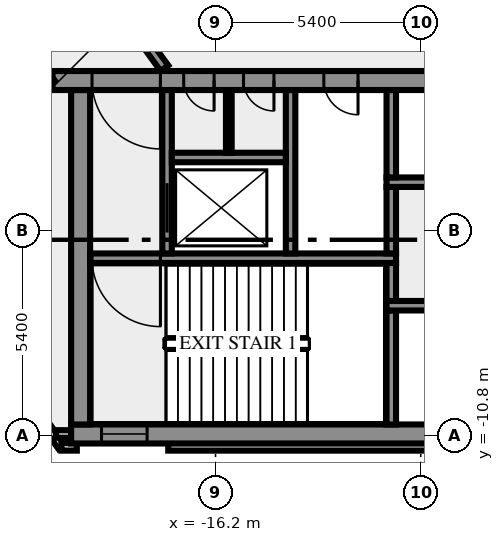
"""IFC4 building model, lengths in metres.
Left out: names, types, materials, properties, quantities, classifications, styles, units other than length and angle.
Written with IfcOpenShell. Run it as: python <this file> out.ifc"""

import sys

from ifc_helpers import new_model, si_unit, direction, frame, frame_2d, origin, place, context, subcontext, project, spatial, rectangle, extrude, element, fill, save


model = new_model("IFC4")
c1 = context("Model", 3, precision=1e-05, world=origin(), true_north=direction((0.0, 1.0)))
c2 = subcontext(c1, "Body", "Model", "MODEL_VIEW")
j1 = project(units=[si_unit("LENGTHUNIT", "METRE"), si_unit("PLANEANGLEUNIT", "RADIAN")], contexts=[c1])
p1 = place(None, origin())
s1 = spatial("IfcSite", under=j1, at=p1, CompositionType="ELEMENT")
p2 = place(p1, origin())
s2 = spatial("IfcBuilding", under=s1, at=p2, CompositionType="ELEMENT")
p3 = place(p2, frame((0.0, 0.0, 242.0)))
s3 = spatial("IfcBuildingStorey", under=s2, at=p3, CompositionType="ELEMENT", Elevation=242.0)
p4 = place(p3, frame((-21.833, -8.909, 0.0), z_axis=(0.0, 0.0, 1.0), x_axis=(0.587766567315, -0.809030569476, 0.0)))
e1 = element("IfcWall", 1, at=p4, inside=s3, PredefinedType="SOLIDWALL", context=c2, shape_type="SweptSolid", body=[
    extrude(rectangle(XDim=2.688, YDim=0.2, at=frame_2d((1.344, 0.0))), origin(), (0.0, 0.0, 1.0), 5.6),
])
p5 = place(p3, frame((-20.256, -11.088, 0.0), z_axis=(0.0, 0.0, 1.0), x_axis=(1.0, 0.0, 0.0)))
e2 = element("IfcWall", 2, at=p5, inside=s3, PredefinedType="SOLIDWALL", context=c2, shape_type="SweptSolid", body=[
    extrude(rectangle(XDim=0.406, YDim=0.2, at=frame_2d((0.203, 0.0))), origin(), (0.0, 0.0, 1.0), 5.6),
])
p6 = place(p3, frame((-17.444, -11.088, 0.0), z_axis=(0.0, 0.0, 1.0), x_axis=(1.0, 0.0, 0.0)))
e3 = element("IfcWall", 3, at=p6, inside=s3, PredefinedType="SOLIDWALL", context=c2, shape_type="SweptSolid", body=[
    extrude(rectangle(XDim=34.888, YDim=0.2, at=frame_2d((17.444, 0.0))), origin(), (0.0, 0.0, 1.0), 5.6),
])
p7 = place(p3, frame((-19.98, -10.75, 0.0), z_axis=(0.0, 0.0, 1.0), x_axis=(-1.0, 0.0, 0.0)))
e4 = element("IfcWall", 4, at=p7, inside=s3, PredefinedType="SOLIDWALL", context=c2, shape_type="SweptSolid", body=[
    extrude(rectangle(XDim=0.417, YDim=0.2, at=frame_2d((0.208, 0.0))), origin(), (0.0, 0.0, 1.0), 5.6),
])
p8 = place(p3, frame((-20.0, -10.75, 0.0), z_axis=(0.0, 0.0, 1.0), x_axis=(1.0, 0.0, 0.0)))
e5 = element("IfcWall", 5, at=p8, inside=s3, PredefinedType="SHEAR", context=c2, shape_type="SweptSolid", body=[
    extrude(rectangle(XDim=40.0, YDim=0.5, at=frame_2d((20.0, 0.0))), origin(), (0.0, 0.0, 1.0), 5.6),
])
p9 = place(p8, frame((0.8, 0.0, 1.0)))
e6 = element("IfcOpeningElement", 6, at=p9, cuts=e5, PredefinedType="OPENING", context=c2, shape_type="SweptSolid", body=[
    extrude(rectangle(XDim=1.2, YDim=1.2, at=frame_2d((0.6, 0.6))), frame((0.0, 0.26, 0.0), z_axis=(0.0, -1.0, 0.0), x_axis=(1.0, 0.0, 0.0)), (0.0, 0.0, 1.0), 0.52),
])
p10 = place(p8, frame((38.0, 0.0, 1.0)))
e7 = element("IfcOpeningElement", 7, at=p10, cuts=e5, PredefinedType="OPENING", context=c2, shape_type="SweptSolid", body=[
    extrude(rectangle(XDim=1.2, YDim=1.2, at=frame_2d((0.6, 0.6))), frame((0.0, 0.26, 0.0), z_axis=(0.0, -1.0, 0.0), x_axis=(1.0, 0.0, 0.0)), (0.0, 0.0, 1.0), 0.52),
])
p11 = place(p3, frame((-19.75, -10.5, 0.0), z_axis=(0.0, 0.0, 1.0), x_axis=(0.0, 1.0, 0.0)))
e8 = element("IfcWall", 8, at=p11, inside=s3, PredefinedType="SHEAR", context=c2, shape_type="SweptSolid", body=[
    extrude(rectangle(XDim=8.8, YDim=0.5, at=frame_2d((4.4, 0.0))), origin(), (0.0, 0.0, 1.0), 5.6),
])
p12 = place(p3, frame((-11.575, -10.5, 0.0), z_axis=(0.0, 0.0, 1.0), x_axis=(0.0, 1.0, 0.0)))
e9 = element("IfcWall", 9, at=p12, inside=s3, PredefinedType="SHEAR", context=c2, shape_type="SweptSolid", body=[
    extrude(rectangle(XDim=3.0, YDim=0.25, at=frame_2d((1.5, 0.0))), origin(), (0.0, 0.0, 1.0), 5.6),
])
p13 = place(p3, frame((11.7, -7.375, 0.0), z_axis=(0.0, 0.0, 1.0), x_axis=(-1.0, 0.0, 0.0)))
e10 = element("IfcWall", 10, at=p13, inside=s3, PredefinedType="SHEAR", context=c2, shape_type="SweptSolid", body=[
    extrude(rectangle(XDim=23.4, YDim=0.25, at=frame_2d((11.7, 0.0))), origin(), (0.0, 0.0, 1.0), 5.6),
])
p14 = place(p13, frame((14.4, 0.0, 0.0)))
e11 = element("IfcOpeningElement", 11, at=p14, cuts=e10, PredefinedType="OPENING", context=c2, shape_type="SweptSolid", body=[
    extrude(rectangle(XDim=0.9, YDim=2.1, at=frame_2d((0.45, 1.05))), frame((0.0, 0.135, 0.0), z_axis=(0.0, -1.0, 0.0), x_axis=(1.0, 0.0, 0.0)), (0.0, 0.0, 1.0), 0.27),
])
p15 = place(p13, frame((12.5, 0.0, 0.0)))
e12 = element("IfcOpeningElement", 12, at=p15, cuts=e10, PredefinedType="OPENING", context=c2, shape_type="SweptSolid", body=[
    extrude(rectangle(XDim=0.9, YDim=2.1, at=frame_2d((0.45, 1.05))), frame((0.0, 0.135, 0.0), z_axis=(0.0, -1.0, 0.0), x_axis=(1.0, 0.0, 0.0)), (0.0, 0.0, 1.0), 0.27),
])
p16 = place(p13, frame((10.6, 0.0, 0.0)))
e13 = element("IfcOpeningElement", 13, at=p16, cuts=e10, PredefinedType="OPENING", context=c2, shape_type="SweptSolid", body=[
    extrude(rectangle(XDim=0.9, YDim=2.1, at=frame_2d((0.45, 1.05))), frame((0.0, 0.135, 0.0), z_axis=(0.0, -1.0, 0.0), x_axis=(1.0, 0.0, 0.0)), (0.0, 0.0, 1.0), 0.27),
])
p17 = place(p3, frame((-11.575, -7.25, 0.0), z_axis=(0.0, 0.0, 1.0), x_axis=(0.0, 1.0, 0.0)))
e14 = element("IfcWall", 14, at=p17, inside=s3, PredefinedType="SHEAR", context=c2, shape_type="SweptSolid", body=[
    extrude(rectangle(XDim=1.0, YDim=0.25, at=frame_2d((0.5, 0.0))), origin(), (0.0, 0.0, 1.0), 5.6),
])
p18 = place(p3, frame((-11.45, -6.125, 0.0), z_axis=(0.0, 0.0, 1.0), x_axis=(-1.0, 0.0, 0.0)))
e15 = element("IfcWall", 15, at=p18, inside=s3, PredefinedType="SHEAR", context=c2, shape_type="SweptSolid", body=[
    extrude(rectangle(XDim=8.05, YDim=0.25, at=frame_2d((4.025, 0.0))), origin(), (0.0, 0.0, 1.0), 5.6),
])
p19 = place(p18, frame((6.2, 0.0, 0.0)))
e16 = element("IfcOpeningElement", 16, at=p19, cuts=e15, PredefinedType="OPENING", context=c2, shape_type="SweptSolid", body=[
    extrude(rectangle(XDim=1.8, YDim=2.1, at=frame_2d((0.9, 1.05))), frame((0.0, 0.135, 0.0), z_axis=(0.0, -1.0, 0.0), x_axis=(1.0, 0.0, 0.0)), (0.0, 0.0, 1.0), 0.27),
])
p20 = place(p3, frame((-17.475, -6.0, 0.0), z_axis=(0.0, 0.0, 1.0), x_axis=(0.0, 1.0, 0.0)))
e17 = element("IfcWall", 17, at=p20, inside=s3, PredefinedType="SHEAR", context=c2, shape_type="SweptSolid", body=[
    extrude(rectangle(XDim=4.3, YDim=0.25, at=frame_2d((2.15, 0.0))), origin(), (0.0, 0.0, 1.0), 5.6),
])
p21 = place(p20, frame((0.55, 0.0, 0.0)))
e18 = element("IfcOpeningElement", 18, at=p21, cuts=e17, PredefinedType="OPENING", context=c2, shape_type="SweptSolid", body=[
    extrude(rectangle(XDim=1.3, YDim=2.1, at=frame_2d((0.65, 1.05))), frame((0.0, 0.135, 0.0), z_axis=(0.0, -1.0, 0.0), x_axis=(1.0, 0.0, 0.0)), (0.0, 0.0, 1.0), 0.27),
])
p22 = place(p3, frame((-14.225, -6.0, 0.0), z_axis=(0.0, 0.0, 1.0), x_axis=(0.0, 1.0, 0.0)))
e19 = element("IfcWall", 19, at=p22, inside=s3, PredefinedType="SHEAR", context=c2, shape_type="SweptSolid", body=[
    extrude(rectangle(XDim=4.3, YDim=0.25, at=frame_2d((2.15, 0.0))), origin(), (0.0, 0.0, 1.0), 5.6),
])
p23 = place(p3, frame((-11.575, -6.0, 0.0), z_axis=(0.0, 0.0, 1.0), x_axis=(0.0, 1.0, 0.0)))
e20 = element("IfcWall", 20, at=p23, inside=s3, PredefinedType="SHEAR", context=c2, shape_type="SweptSolid", body=[
    extrude(rectangle(XDim=1.75, YDim=0.25, at=frame_2d((0.875, 0.0))), origin(), (0.0, 0.0, 1.0), 5.6),
])
p24 = place(p3, frame((-11.7, -4.125, 0.0), z_axis=(0.0, 0.0, 1.0), x_axis=(1.0, 0.0, 0.0)))
e21 = element("IfcWall", 21, at=p24, inside=s3, PredefinedType="SHEAR", context=c2, shape_type="SweptSolid", body=[
    extrude(rectangle(XDim=7.75, YDim=0.25, at=frame_2d((3.875, 0.0))), origin(), (0.0, 0.0, 1.0), 5.6),
])
p25 = place(p3, frame((-11.575, -4.0, 0.0), z_axis=(0.0, 0.0, 1.0), x_axis=(0.0, 1.0, 0.0)))
e22 = element("IfcWall", 22, at=p25, inside=s3, PredefinedType="SHEAR", context=c2, shape_type="SweptSolid", body=[
    extrude(rectangle(XDim=2.3, YDim=0.25, at=frame_2d((1.15, 0.0))), origin(), (0.0, 0.0, 1.0), 5.6),
])
p26 = place(p3, frame((-17.35, -3.475, 0.0), z_axis=(0.0, 0.0, 1.0), x_axis=(1.0, 0.0, 0.0)))
e23 = element("IfcWall", 23, at=p26, inside=s3, PredefinedType="SHEAR", context=c2, shape_type="SweptSolid", body=[
    extrude(rectangle(XDim=3.0, YDim=0.25, at=frame_2d((1.5, 0.0))), origin(), (0.0, 0.0, 1.0), 5.6),
])
p27 = place(p3, frame((-15.85, -3.35, 0.0), z_axis=(0.0, 0.0, 1.0), x_axis=(0.0, 1.0, 0.0)))
e24 = element("IfcWall", 24, at=p27, inside=s3, PredefinedType="PARTITIONING", context=c2, shape_type="SweptSolid", body=[
    extrude(rectangle(XDim=1.65, YDim=0.15, at=frame_2d((0.825, 0.0))), origin(), (0.0, 0.0, 1.0), 5.6),
])
p28 = place(p3, frame((20.49, -1.45, 0.0), z_axis=(0.0, 0.0, 1.0), x_axis=(-1.0, 0.0, 0.0)))
e25 = element("IfcWall", 25, at=p28, inside=s3, PredefinedType="SHEAR", context=c2, shape_type="SweptSolid", body=[
    extrude(rectangle(XDim=40.98, YDim=0.5, at=frame_2d((20.49, 0.0))), origin(), (0.0, 0.0, 1.0), 5.6),
])
p29 = place(p28, frame((38.14, 0.0, 0.0)))
e26 = element("IfcOpeningElement", 26, at=p29, cuts=e25, PredefinedType="OPENING", context=c2, shape_type="SweptSolid", body=[
    extrude(rectangle(XDim=1.8, YDim=2.1, at=frame_2d((0.9, 1.05))), frame((0.0, 0.26, 0.0), z_axis=(0.0, -1.0, 0.0), x_axis=(1.0, 0.0, 0.0)), (0.0, 0.0, 1.0), 0.52),
])
p30 = place(p28, frame((36.728, 0.0, 0.0)))
e27 = element("IfcOpeningElement", 27, at=p30, cuts=e25, PredefinedType="OPENING", context=c2, shape_type="SweptSolid", body=[
    extrude(rectangle(XDim=0.8, YDim=2.1, at=frame_2d((0.4, 1.05))), frame((0.0, 0.26, 0.0), z_axis=(0.0, -1.0, 0.0), x_axis=(1.0, 0.0, 0.0)), (0.0, 0.0, 1.0), 0.52),
])
p31 = place(p28, frame((35.153, 0.0, 0.0)))
e28 = element("IfcOpeningElement", 28, at=p31, cuts=e25, PredefinedType="OPENING", context=c2, shape_type="SweptSolid", body=[
    extrude(rectangle(XDim=0.8, YDim=2.1, at=frame_2d((0.4, 1.05))), frame((0.0, 0.26, 0.0), z_axis=(0.0, -1.0, 0.0), x_axis=(1.0, 0.0, 0.0)), (0.0, 0.0, 1.0), 0.52),
])
p32 = place(p28, frame((32.94, 0.0, 0.0)))
e29 = element("IfcOpeningElement", 29, at=p32, cuts=e25, PredefinedType="OPENING", context=c2, shape_type="SweptSolid", body=[
    extrude(rectangle(XDim=0.9, YDim=2.1, at=frame_2d((0.45, 1.05))), frame((0.0, 0.26, 0.0), z_axis=(0.0, -1.0, 0.0), x_axis=(1.0, 0.0, 0.0)), (0.0, 0.0, 1.0), 0.52),
])
p33 = place(p28, frame((20.74, 0.0, 0.0)))
e30 = element("IfcOpeningElement", 30, at=p33, cuts=e25, PredefinedType="OPENING", context=c2, shape_type="SweptSolid", body=[
    extrude(rectangle(XDim=2.0, YDim=2.1, at=frame_2d((1.0, 1.05))), frame((0.0, 0.26, 0.0), z_axis=(0.0, -1.0, 0.0), x_axis=(1.0, 0.0, 0.0)), (0.0, 0.0, 1.0), 0.52),
])
p34 = place(p28, frame((7.14, 0.0, 0.0)))
e31 = element("IfcOpeningElement", 31, at=p34, cuts=e25, PredefinedType="OPENING", context=c2, shape_type="SweptSolid", body=[
    extrude(rectangle(XDim=0.9, YDim=2.1, at=frame_2d((0.45, 1.05))), frame((0.0, 0.26, 0.0), z_axis=(0.0, -1.0, 0.0), x_axis=(1.0, 0.0, 0.0)), (0.0, 0.0, 1.0), 0.52),
])
p35 = place(p28, frame((4.19, 0.0, 0.0)))
e32 = element("IfcOpeningElement", 32, at=p35, cuts=e25, PredefinedType="OPENING", context=c2, shape_type="SweptSolid", body=[
    extrude(rectangle(XDim=0.9, YDim=2.1, at=frame_2d((0.45, 1.05))), frame((0.0, 0.26, 0.0), z_axis=(0.0, -1.0, 0.0), x_axis=(1.0, 0.0, 0.0)), (0.0, 0.0, 1.0), 0.52),
])
p36 = place(p28, frame((1.04, 0.0, 0.0)))
e33 = element("IfcOpeningElement", 33, at=p36, cuts=e25, PredefinedType="OPENING", context=c2, shape_type="SweptSolid", body=[
    extrude(rectangle(XDim=1.8, YDim=2.1, at=frame_2d((0.9, 1.05))), frame((0.0, 0.26, 0.0), z_axis=(0.0, -1.0, 0.0), x_axis=(1.0, 0.0, 0.0)), (0.0, 0.0, 1.0), 0.52),
])
p37 = place(p3, frame((-20.531, -1.523, 0.0), z_axis=(0.0, 0.0, 1.0), x_axis=(-0.587782114023, 0.809019274452, 0.0)))
e34 = element("IfcWall", 34, at=p37, inside=s3, PredefinedType="SOLIDWALL", context=c2, shape_type="SweptSolid", body=[
    extrude(rectangle(XDim=22.212, YDim=0.25, at=frame_2d((11.106, 0.0))), origin(), (0.0, 0.0, 1.0), 5.6),
])
p38 = place(p37, frame((11.865, 0.0, 0.0)))
e35 = element("IfcOpeningElement", 35, at=p38, cuts=e34, PredefinedType="OPENING", context=c2, shape_type="SweptSolid", body=[
    extrude(rectangle(XDim=1.2, YDim=2.1, at=frame_2d((0.6, 1.05))), frame((0.0, 0.135, 0.0), z_axis=(0.0, -1.0, 0.0), x_axis=(1.0, 0.0, 0.0)), (0.0, 0.0, 1.0), 0.27),
])
p39 = place(p37, frame((9.966, 0.0, 0.0)))
e36 = element("IfcOpeningElement", 36, at=p39, cuts=e34, PredefinedType="OPENING", context=c2, shape_type="SweptSolid", body=[
    extrude(rectangle(XDim=1.2, YDim=2.1, at=frame_2d((0.6, 1.05))), frame((0.0, 0.135, 0.0), z_axis=(0.0, -1.0, 0.0), x_axis=(1.0, 0.0, 0.0)), (0.0, 0.0, 1.0), 0.27),
])
p40 = place(p3, frame((-31.387, 17.927, 0.0), z_axis=(0.0, 0.0, 1.0), x_axis=(0.587788830132, -0.80901439491, 0.0)))
e37 = element("IfcWall", 37, at=p40, inside=s3, PredefinedType="SOLIDWALL", context=c2, shape_type="SweptSolid", body=[
    extrude(rectangle(XDim=23.549, YDim=0.25, at=frame_2d((11.775, 0.0))), origin(), (0.0, 0.0, 1.0), 5.6),
])
p41 = place(p40, frame((18.907, 0.0, 0.0)))
e38 = element("IfcOpeningElement", 38, at=p41, cuts=e37, PredefinedType="OPENING", context=c2, shape_type="SweptSolid", body=[
    extrude(rectangle(XDim=1.2, YDim=2.1, at=frame_2d((0.6, 1.05))), frame((0.0, 0.135, 0.0), z_axis=(0.0, -1.0, 0.0), x_axis=(1.0, 0.0, 0.0)), (0.0, 0.0, 1.0), 0.27),
])
p42 = place(p9, origin())
e39 = element("IfcWindow", 39, at=p42, inside=s3, PartitioningType="SINGLE_PANEL", PredefinedType="WINDOW", context=c2, shape_type="SweptSolid", body=[
    extrude(rectangle(XDim=1.2, YDim=1.2, at=frame_2d((0.6, 0.6))), frame((0.0, 0.03, 0.0), z_axis=(0.0, -1.0, 0.0), x_axis=(1.0, 0.0, 0.0)), (0.0, 0.0, 1.0), 0.06),
])
fill(e6, e39)
p43 = place(p19, origin())
e40 = element("IfcDoor", 40, at=p43, inside=s3, OperationType="DOUBLE_DOOR_SINGLE_SWING", PredefinedType="DOOR", context=c2, shape_type="SweptSolid", body=[
    extrude(rectangle(XDim=1.8, YDim=2.1, at=frame_2d((0.9, 1.05))), frame((0.0, 0.025, 0.0), z_axis=(0.0, -1.0, 0.0), x_axis=(1.0, 0.0, 0.0)), (0.0, 0.0, 1.0), 0.05),
])
fill(e16, e40)
p44 = place(p21, origin())
e41 = element("IfcDoor", 41, at=p44, inside=s3, OperationType="DOUBLE_DOOR_SLIDING", PredefinedType="DOOR", context=c2, shape_type="SweptSolid", body=[
    extrude(rectangle(XDim=1.3, YDim=2.1, at=frame_2d((0.65, 1.05))), frame((0.0, 0.025, 0.0), z_axis=(0.0, -1.0, 0.0), x_axis=(1.0, 0.0, 0.0)), (0.0, 0.0, 1.0), 0.05),
])
fill(e18, e41)
p45 = place(p29, origin())
e42 = element("IfcDoor", 42, at=p45, inside=s3, OperationType="DOUBLE_DOOR_SINGLE_SWING", PredefinedType="DOOR", context=c2, shape_type="SweptSolid", body=[
    extrude(rectangle(XDim=1.8, YDim=2.1, at=frame_2d((0.9, 1.05))), frame((0.0, 0.025, 0.0), z_axis=(0.0, -1.0, 0.0), x_axis=(1.0, 0.0, 0.0)), (0.0, 0.0, 1.0), 0.05),
])
fill(e26, e42)
p46 = place(p30, origin())
e43 = element("IfcDoor", 43, at=p46, inside=s3, OperationType="SINGLE_SWING_RIGHT", PredefinedType="DOOR", context=c2, shape_type="SweptSolid", body=[
    extrude(rectangle(XDim=0.8, YDim=2.1, at=frame_2d((0.4, 1.05))), frame((0.0, 0.025, 0.0), z_axis=(0.0, -1.0, 0.0), x_axis=(1.0, 0.0, 0.0)), (0.0, 0.0, 1.0), 0.05),
])
fill(e27, e43)
p47 = place(p31, origin())
e44 = element("IfcDoor", 44, at=p47, inside=s3, OperationType="SINGLE_SWING_RIGHT", PredefinedType="DOOR", context=c2, shape_type="SweptSolid", body=[
    extrude(rectangle(XDim=0.8, YDim=2.1, at=frame_2d((0.4, 1.05))), frame((0.0, 0.025, 0.0), z_axis=(0.0, -1.0, 0.0), x_axis=(1.0, 0.0, 0.0)), (0.0, 0.0, 1.0), 0.05),
])
fill(e28, e44)
p48 = place(p32, origin())
e45 = element("IfcDoor", 45, at=p48, inside=s3, OperationType="SINGLE_SWING_RIGHT", PredefinedType="DOOR", context=c2, shape_type="SweptSolid", body=[
    extrude(rectangle(XDim=0.9, YDim=2.1, at=frame_2d((0.45, 1.05))), frame((0.0, 0.025, 0.0), z_axis=(0.0, -1.0, 0.0), x_axis=(1.0, 0.0, 0.0)), (0.0, 0.0, 1.0), 0.05),
])
fill(e29, e45)
save(model, sys.argv[1])
